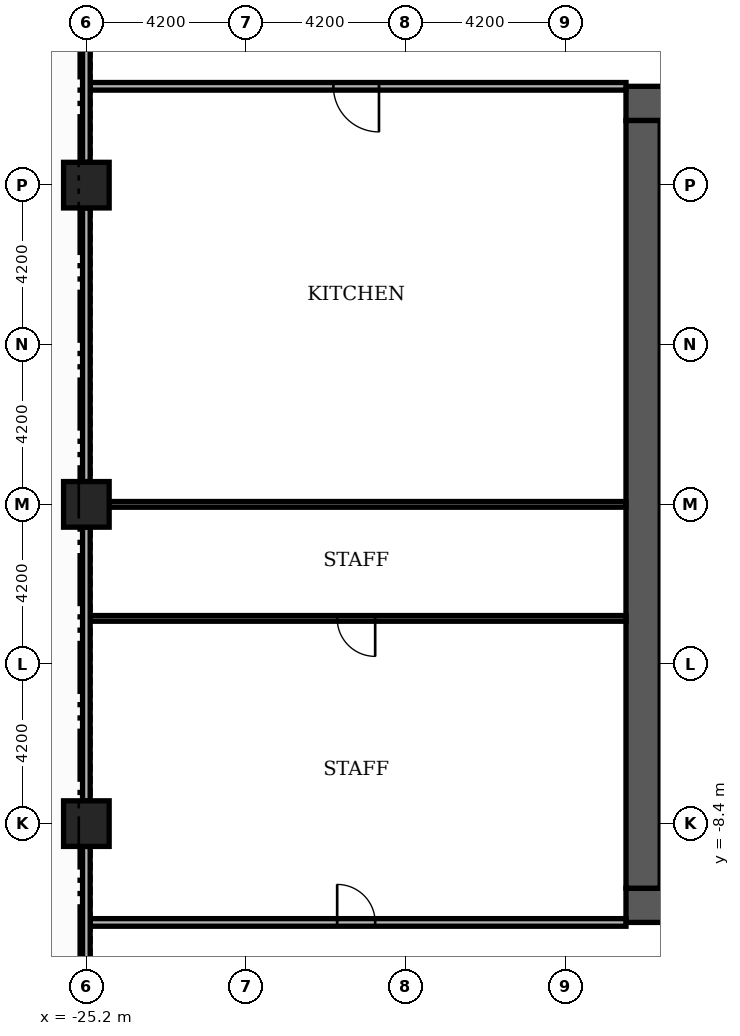
"""IFC4 building model, lengths in metres.
Left out: names, types, materials, properties, quantities, classifications, styles, units other than length and angle.
Written with IfcOpenShell. Run it as: python <this file> out.ifc"""

import sys

from ifc_helpers import new_model, si_unit, direction, frame, frame_2d, origin, origin_2d, place, context, subcontext, project, spatial, rectangle, extrude, element, fill, save


model = new_model("IFC4")
c1 = context("Model", 3, precision=1e-05, world=origin(), true_north=direction((0.0, 1.0)))
c2 = subcontext(c1, "Body", "Model", "MODEL_VIEW")
j1 = project(units=[si_unit("LENGTHUNIT", "METRE"), si_unit("PLANEANGLEUNIT", "RADIAN")], contexts=[c1])
p1 = place(None, origin())
s1 = spatial("IfcSite", under=j1, at=p1, CompositionType="ELEMENT")
p2 = place(p1, origin())
s2 = spatial("IfcBuilding", under=s1, at=p2, CompositionType="ELEMENT")
p3 = place(p2, frame((0.0, 0.0, 7.2)))
s3 = spatial("IfcBuildingStorey", under=s2, at=p3, CompositionType="ELEMENT", Elevation=7.2)
p4 = place(p3, frame((-11.0, -10.55, 0.0), z_axis=(0.0, 0.0, 1.0), x_axis=(1.0, 0.0, 0.0)))
e1 = element("IfcWall", 1, at=p4, inside=s3, PredefinedType="SHEAR", context=c2, shape_type="SweptSolid", body=[
    extrude(rectangle(XDim=22.0, YDim=0.9, at=frame_2d((11.0, 0.0))), origin(), (0.0, 0.0, 1.0), 4.38),
])
p5 = place(p4, frame((7.4, 0.0, 0.0)))
e2 = element("IfcOpeningElement", 2, at=p5, cuts=e1, PredefinedType="OPENING", context=c2, shape_type="SweptSolid", body=[
    extrude(rectangle(XDim=1.8, YDim=2.2, at=frame_2d((0.9, 1.1))), frame((0.0, 0.46, 0.0), z_axis=(0.0, -1.0, 0.0), x_axis=(1.0, 0.0, 0.0)), (0.0, 0.0, 1.0), 0.92),
])
p6 = place(p3, frame((-11.0, 10.55, 0.0), z_axis=(0.0, 0.0, 1.0), x_axis=(1.0, 0.0, 0.0)))
e3 = element("IfcWall", 3, at=p6, inside=s3, PredefinedType="SHEAR", context=c2, shape_type="SweptSolid", body=[
    extrude(rectangle(XDim=22.0, YDim=0.9, at=frame_2d((11.0, 0.0))), origin(), (0.0, 0.0, 1.0), 4.38),
])
p7 = place(p6, frame((13.3, 0.0, 0.0)))
e4 = element("IfcOpeningElement", 4, at=p7, cuts=e3, PredefinedType="OPENING", context=c2, shape_type="SweptSolid", body=[
    extrude(rectangle(XDim=1.8, YDim=2.2, at=frame_2d((0.9, 1.1))), frame((0.0, 0.46, 0.0), z_axis=(0.0, -1.0, 0.0), x_axis=(1.0, 0.0, 0.0)), (0.0, 0.0, 1.0), 0.92),
])
p8 = place(p3, frame((-10.55, -10.1, 0.0), z_axis=(0.0, 0.0, 1.0), x_axis=(0.0, 1.0, 0.0)))
e5 = element("IfcWall", 5, at=p8, inside=s3, PredefinedType="SHEAR", context=c2, shape_type="SweptSolid", body=[
    extrude(rectangle(XDim=20.2, YDim=0.9, at=frame_2d((10.1, 0.0))), origin(), (0.0, 0.0, 1.0), 4.38),
])
for number, where, z_axis, x_axis in (
    (6, (-25.2, 0.0, 0.0), (0.0, 0.0, 1.0), (1.0, 0.0, 0.0)),
    (7, (-25.2, -8.4, 0.0), (0.0, 0.0, 1.0), (1.0, 0.0, 0.0)),
    (8, (-25.2, 8.4, 0.0), (0.0, 0.0, 1.0), (1.0, 0.0, 0.0)),
):
    element("IfcColumn", number, at=place(p3, frame(where, z_axis=z_axis, x_axis=x_axis)), inside=s3, PredefinedType="COLUMN", context=c2, shape_type="SweptSolid", body=[
        extrude(rectangle(XDim=1.2, YDim=1.2, at=origin_2d()), origin(), (0.0, 0.0, 1.0), 4.8),
    ])
p9 = place(p3, frame((-25.1, -11.0, 0.0), z_axis=(0.0, 0.0, 1.0), x_axis=(1.0, 0.0, 0.0)))
e9 = element("IfcWall", 9, at=p9, inside=s3, PredefinedType="PARTITIONING", context=c2, shape_type="SweptSolid", body=[
    extrude(rectangle(XDim=14.1, YDim=0.2, at=frame_2d((7.05, 0.0))), origin(), (0.0, 0.0, 1.0), 4.38),
])
p10 = place(p9, frame((6.5, 0.0, 0.0)))
e10 = element("IfcOpeningElement", 10, at=p10, cuts=e9, PredefinedType="OPENING", context=c2, shape_type="SweptSolid", body=[
    extrude(rectangle(XDim=1.0, YDim=2.1, at=frame_2d((0.5, 1.05))), frame((0.0, 0.11, 0.0), z_axis=(0.0, -1.0, 0.0), x_axis=(1.0, 0.0, 0.0)), (0.0, 0.0, 1.0), 0.22),
])
p11 = place(p3, frame((-25.1, -3.0, 0.0), z_axis=(0.0, 0.0, 1.0), x_axis=(1.0, 0.0, 0.0)))
e11 = element("IfcWall", 11, at=p11, inside=s3, PredefinedType="PARTITIONING", context=c2, shape_type="SweptSolid", body=[
    extrude(rectangle(XDim=14.1, YDim=0.15, at=frame_2d((7.05, 0.0))), origin(), (0.0, 0.0, 1.0), 4.38),
])
p12 = place(p11, frame((6.5, 0.0, 0.0)))
e12 = element("IfcOpeningElement", 12, at=p12, cuts=e11, PredefinedType="OPENING", context=c2, shape_type="SweptSolid", body=[
    extrude(rectangle(XDim=1.0, YDim=2.1, at=frame_2d((0.5, 1.05))), frame((0.0, 0.085, 0.0), z_axis=(0.0, -1.0, 0.0), x_axis=(1.0, 0.0, 0.0)), (0.0, 0.0, 1.0), 0.17),
])
p13 = place(p3, frame((-24.6, 0.0, 0.0), z_axis=(0.0, 0.0, 1.0), x_axis=(1.0, 0.0, 0.0)))
e13 = element("IfcWall", 13, at=p13, inside=s3, PredefinedType="PARTITIONING", context=c2, shape_type="SweptSolid", body=[
    extrude(rectangle(XDim=13.6, YDim=0.15, at=frame_2d((6.8, 0.0))), origin(), (0.0, 0.0, 1.0), 4.38),
])
p14 = place(p3, frame((-25.1, 11.0, 0.0), z_axis=(0.0, 0.0, 1.0), x_axis=(1.0, 0.0, 0.0)))
e14 = element("IfcWall", 14, at=p14, inside=s3, PredefinedType="PARTITIONING", context=c2, shape_type="SweptSolid", body=[
    extrude(rectangle(XDim=14.1, YDim=0.2, at=frame_2d((7.05, 0.0))), origin(), (0.0, 0.0, 1.0), 4.38),
])
p15 = place(p14, frame((6.4, 0.0, 0.0)))
e15 = element("IfcOpeningElement", 15, at=p15, cuts=e14, PredefinedType="OPENING", context=c2, shape_type="SweptSolid", body=[
    extrude(rectangle(XDim=1.2, YDim=2.2, at=frame_2d((0.6, 1.1))), frame((0.0, 0.11, 0.0), z_axis=(0.0, -1.0, 0.0), x_axis=(1.0, 0.0, 0.0)), (0.0, 0.0, 1.0), 0.22),
])
p16 = place(p3, frame((-25.2, -16.2, 0.0), z_axis=(0.0, 0.0, 1.0), x_axis=(0.0, 1.0, 0.0)))
e16 = element("IfcWall", 16, at=p16, inside=s3, PredefinedType="PARTITIONING", context=c2, shape_type="SweptSolid", body=[
    extrude(rectangle(XDim=7.2, YDim=0.2, at=frame_2d((3.6, 0.0))), origin(), (0.0, 0.0, 1.0), 4.08),
])
p17 = place(p16, frame((1.5, 0.0, 0.0)))
e17 = element("IfcOpeningElement", 17, at=p17, cuts=e16, PredefinedType="OPENING", context=c2, shape_type="SweptSolid", body=[
    extrude(rectangle(XDim=1.8, YDim=2.2, at=frame_2d((0.9, 1.1))), frame((0.0, 0.11, 0.0), z_axis=(0.0, -1.0, 0.0), x_axis=(1.0, 0.0, 0.0)), (0.0, 0.0, 1.0), 0.22),
])
for number, where, z_axis, x_axis in (
    (18, (-25.2, -7.8, 0.0), (0.0, 0.0, 1.0), (0.0, 1.0, 0.0)),
    (19, (-25.2, 0.6, 0.0), (0.0, 0.0, 1.0), (0.0, 1.0, 0.0)),
):
    element("IfcWall", number, at=place(p3, frame(where, z_axis=z_axis, x_axis=x_axis)), inside=s3, PredefinedType="PARTITIONING", context=c2, shape_type="SweptSolid", body=[
        extrude(rectangle(XDim=7.2, YDim=0.2, at=frame_2d((3.6, 0.0))), origin(), (0.0, 0.0, 1.0), 4.08),
    ])
p18 = place(p3, frame((-25.2, 9.0, 0.0), z_axis=(0.0, 0.0, 1.0), x_axis=(0.0, 1.0, 0.0)))
e20 = element("IfcWall", 20, at=p18, inside=s3, PredefinedType="PARTITIONING", context=c2, shape_type="SweptSolid", body=[
    extrude(rectangle(XDim=7.2, YDim=0.2, at=frame_2d((3.6, 0.0))), origin(), (0.0, 0.0, 1.0), 4.08),
])
p19 = place(p18, frame((3.9, 0.0, 0.0)))
e21 = element("IfcOpeningElement", 21, at=p19, cuts=e20, PredefinedType="OPENING", context=c2, shape_type="SweptSolid", body=[
    extrude(rectangle(XDim=1.8, YDim=2.2, at=frame_2d((0.9, 1.1))), frame((0.0, 0.11, 0.0), z_axis=(0.0, -1.0, 0.0), x_axis=(1.0, 0.0, 0.0)), (0.0, 0.0, 1.0), 0.22),
])
p20 = place(p10, origin())
e22 = element("IfcDoor", 22, at=p20, inside=s3, OperationType="SINGLE_SWING_LEFT", PredefinedType="DOOR", context=c2, shape_type="SweptSolid", body=[
    extrude(rectangle(XDim=1.0, YDim=2.1, at=frame_2d((0.5, 1.05))), frame((0.0, 0.025, 0.0), z_axis=(0.0, -1.0, 0.0), x_axis=(1.0, 0.0, 0.0)), (0.0, 0.0, 1.0), 0.05),
])
fill(e10, e22)
p21 = place(p12, origin())
e23 = element("IfcDoor", 23, at=p21, inside=s3, OperationType="SINGLE_SWING_RIGHT", PredefinedType="DOOR", context=c2, shape_type="SweptSolid", body=[
    extrude(rectangle(XDim=1.0, YDim=2.1, at=frame_2d((0.5, 1.05))), frame((0.0, 0.025, 0.0), z_axis=(0.0, -1.0, 0.0), x_axis=(1.0, 0.0, 0.0)), (0.0, 0.0, 1.0), 0.05),
])
fill(e12, e23)
p22 = place(p15, origin())
e24 = element("IfcDoor", 24, at=p22, inside=s3, OperationType="SINGLE_SWING_RIGHT", PredefinedType="DOOR", context=c2, shape_type="SweptSolid", body=[
    extrude(rectangle(XDim=1.2, YDim=2.2, at=frame_2d((0.6, 1.1))), frame((0.0, 0.025, 0.0), z_axis=(0.0, -1.0, 0.0), x_axis=(1.0, 0.0, 0.0)), (0.0, 0.0, 1.0), 0.05),
])
fill(e15, e24)
save(model, sys.argv[1])
